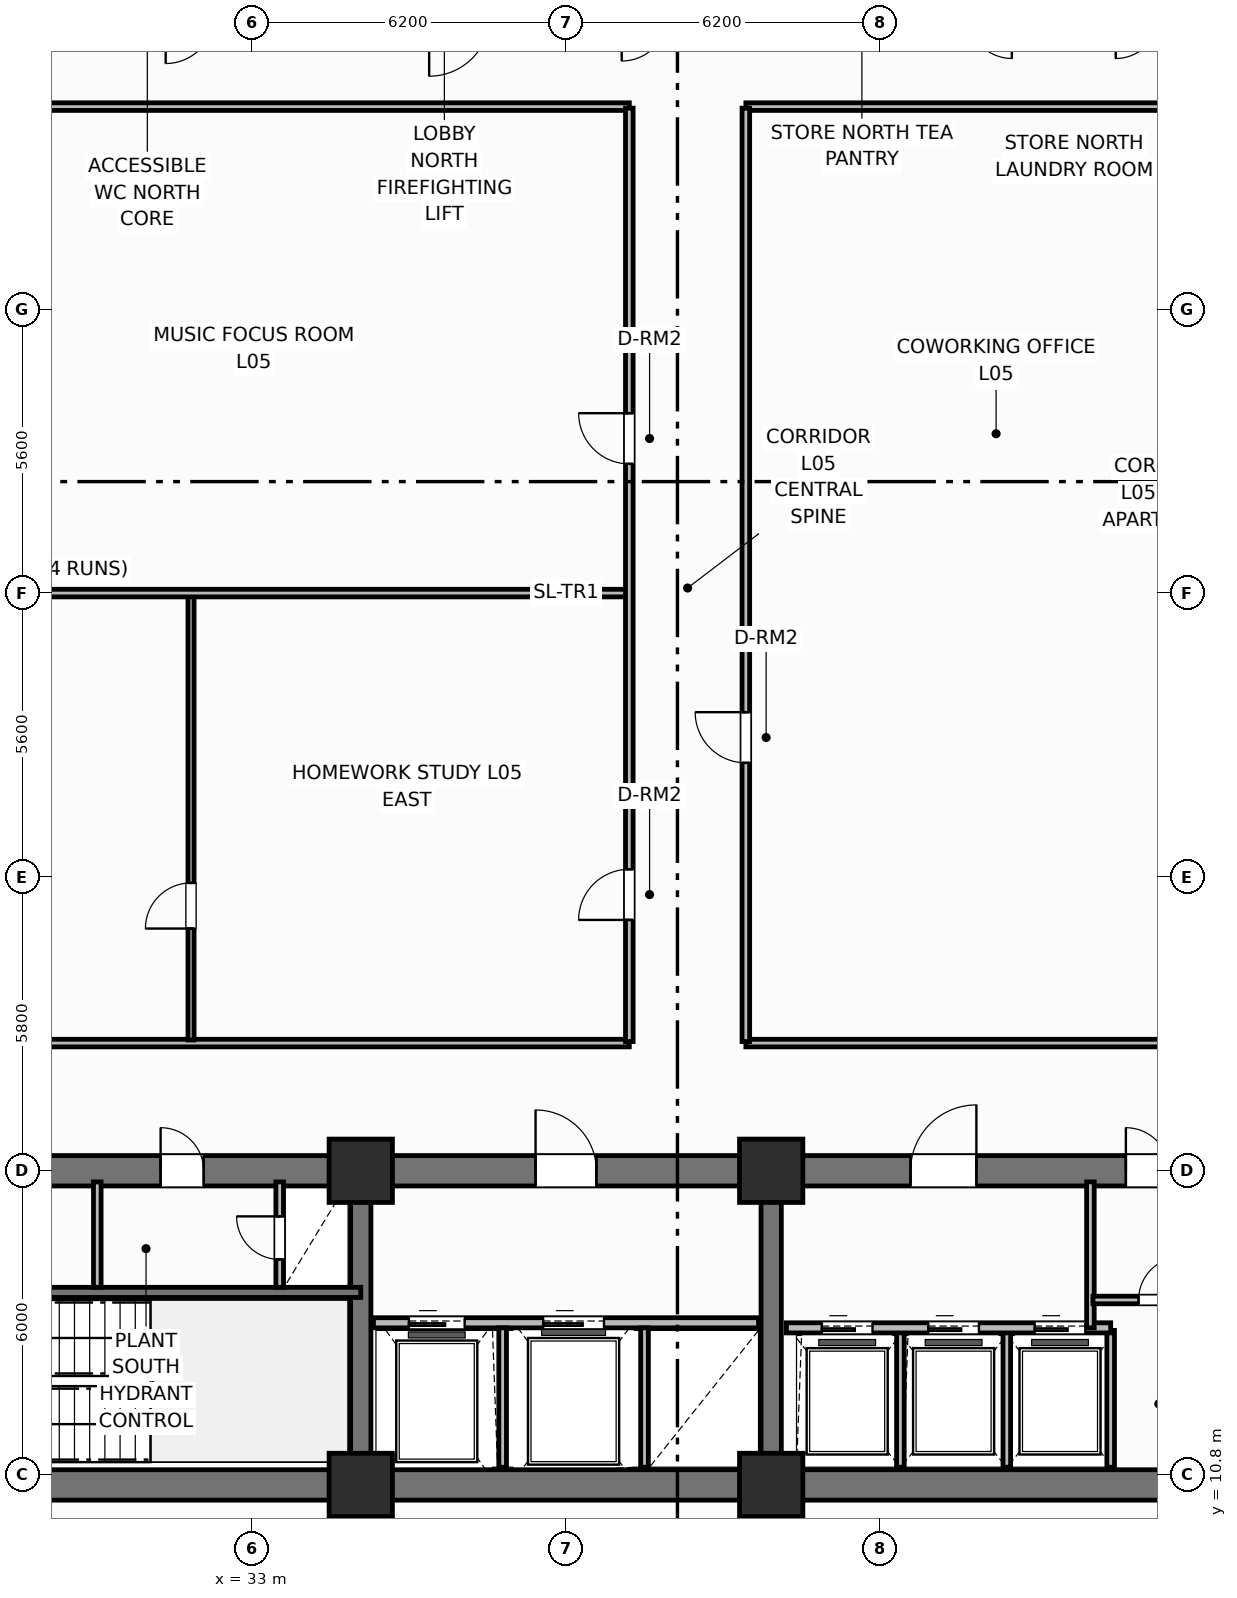
"""IFC4 building model, lengths in metres.
Left out: names, types, materials, properties, quantities, classifications, styles, units other than length and angle.
Written with IfcOpenShell. Run it as: python <this file> out.ifc"""

import sys

from ifc_helpers import new_model, si_unit, direction, frame, frame_2d, origin, origin_2d, place, context, subcontext, project, spatial, rectangle, extrude, element, fill, save


model = new_model("IFC4")
c1 = context("Model", 3, precision=1e-05, world=origin(), true_north=direction((0.0, 1.0)))
c2 = subcontext(c1, "Body", "Model", "MODEL_VIEW")
j1 = project(units=[si_unit("LENGTHUNIT", "METRE"), si_unit("PLANEANGLEUNIT", "RADIAN")], contexts=[c1])
p1 = place(None, origin())
s1 = spatial("IfcSite", under=j1, at=p1, CompositionType="ELEMENT")
p2 = place(p1, origin())
s2 = spatial("IfcBuilding", under=s1, at=p2, CompositionType="ELEMENT")
p3 = place(p2, frame((0.0, 0.0, 24.6)))
s3 = spatial("IfcBuildingStorey", under=s2, at=p3, CompositionType="ELEMENT", Elevation=24.6)
p4 = place(p3, frame((52.8, 10.6, 0.0), z_axis=(0.0, 0.0, 1.0), x_axis=(-1.0, 0.0, 0.0)))
e1 = element("IfcWall", 1, at=p4, inside=s3, PredefinedType="SHEAR", context=c2, shape_type="SweptSolid", body=[
    extrude(rectangle(XDim=27.2, YDim=0.6, at=frame_2d((13.6, 0.0))), origin(), (0.0, 0.0, 1.0), 4.2),
])
p5 = place(p3, frame((25.6, 16.8, 0.0), z_axis=(0.0, 0.0, 1.0), x_axis=(1.0, 0.0, 0.0)))
e2 = element("IfcWall", 2, at=p5, inside=s3, PredefinedType="SHEAR", context=c2, shape_type="SweptSolid", body=[
    extrude(rectangle(XDim=27.2, YDim=0.6, at=frame_2d((13.6, 0.0))), origin(), (0.0, 0.0, 1.0), 4.2),
])
p6 = place(p5, frame((1.8, 0.0, 0.0)))
e3 = element("IfcOpeningElement", 3, at=p6, cuts=e2, PredefinedType="OPENING", context=c2, shape_type="SweptSolid", body=[
    extrude(rectangle(XDim=1.1, YDim=2.15, at=frame_2d((0.55, 1.075))), frame((0.0, 0.31, 0.0), z_axis=(0.0, -1.0, 0.0), x_axis=(1.0, 0.0, 0.0)), (0.0, 0.0, 1.0), 0.62),
])
p7 = place(p5, frame((5.6, 0.0, 0.0)))
e4 = element("IfcOpeningElement", 4, at=p7, cuts=e2, PredefinedType="OPENING", context=c2, shape_type="SweptSolid", body=[
    extrude(rectangle(XDim=0.85, YDim=2.1, at=frame_2d((0.425, 1.05))), frame((0.0, 0.31, 0.0), z_axis=(0.0, -1.0, 0.0), x_axis=(1.0, 0.0, 0.0)), (0.0, 0.0, 1.0), 0.62),
])
p8 = place(p5, frame((13.0, 0.0, 0.0)))
e5 = element("IfcOpeningElement", 5, at=p8, cuts=e2, PredefinedType="OPENING", context=c2, shape_type="SweptSolid", body=[
    extrude(rectangle(XDim=1.2, YDim=2.15, at=frame_2d((0.6, 1.075))), frame((0.0, 0.31, 0.0), z_axis=(0.0, -1.0, 0.0), x_axis=(1.0, 0.0, 0.0)), (0.0, 0.0, 1.0), 0.62),
])
p9 = place(p5, frame((20.4, 0.0, 0.0)))
e6 = element("IfcOpeningElement", 6, at=p9, cuts=e2, PredefinedType="OPENING", context=c2, shape_type="SweptSolid", body=[
    extrude(rectangle(XDim=1.3, YDim=2.2, at=frame_2d((0.65, 1.1))), frame((0.0, 0.31, 0.0), z_axis=(0.0, -1.0, 0.0), x_axis=(1.0, 0.0, 0.0)), (0.0, 0.0, 1.0), 0.62),
])
p10 = place(p5, frame((24.65, 0.0, 0.0)))
e7 = element("IfcOpeningElement", 7, at=p10, cuts=e2, PredefinedType="OPENING", context=c2, shape_type="SweptSolid", body=[
    extrude(rectangle(XDim=0.85, YDim=2.1, at=frame_2d((0.425, 1.05))), frame((0.0, 0.31, 0.0), z_axis=(0.0, -1.0, 0.0), x_axis=(1.0, 0.0, 0.0)), (0.0, 0.0, 1.0), 0.62),
])
for number, where, z_axis, x_axis in (
    (8, (35.15, 10.9, 0.0), (0.0, 0.0, 1.0), (0.0, 1.0, 0.0)),
    (9, (43.25, 10.9, 0.0), (0.0, 0.0, 1.0), (0.0, 1.0, 0.0)),
):
    element("IfcWall", number, at=place(p3, frame(where, z_axis=z_axis, x_axis=x_axis)), inside=s3, PredefinedType="SHEAR", context=c2, shape_type="SweptSolid", body=[
        extrude(rectangle(XDim=5.6, YDim=0.4, at=frame_2d((2.8, 0.0))), origin(), (0.0, 0.0, 1.0), 4.2),
    ])
for number, where, z_axis, x_axis in (
    (10, (35.15, 10.6, 0.0), (0.0, 0.0, 1.0), (1.0, 0.0, 0.0)),
    (11, (35.15, 16.8, 0.0), (0.0, 0.0, 1.0), (1.0, 0.0, 0.0)),
    (12, (43.25, 10.6, 0.0), (0.0, 0.0, 1.0), (1.0, 0.0, 0.0)),
    (13, (43.25, 16.8, 0.0), (0.0, 0.0, 1.0), (1.0, 0.0, 0.0)),
):
    element("IfcColumn", number, at=place(p3, frame(where, z_axis=z_axis, x_axis=x_axis)), inside=s3, PredefinedType="COLUMN", context=c2, shape_type="SweptSolid", body=[
        extrude(rectangle(XDim=1.25, YDim=1.25, at=origin_2d()), origin(), (0.0, 0.0, 1.0), 4.2),
    ])
p11 = place(p3, frame((25.6, 14.4, 0.0), z_axis=(0.0, 0.0, 1.0), x_axis=(1.0, 0.0, 0.0)))
e14 = element("IfcWall", 14, at=p11, inside=s3, PredefinedType="SHEAR", context=c2, shape_type="SweptSolid", body=[
    extrude(rectangle(XDim=9.55, YDim=0.2, at=frame_2d((4.775, 0.0))), origin(), (0.0, 0.0, 1.0), 4.2),
])
p12 = place(p11, frame((1.05, 0.0, 0.0)))
e15 = element("IfcOpeningElement", 15, at=p12, cuts=e14, PredefinedType="OPENING", context=c2, shape_type="SweptSolid", body=[
    extrude(rectangle(XDim=1.1, YDim=2.15, at=frame_2d((0.55, 1.075))), frame((0.0, 0.11, 0.0), z_axis=(0.0, -1.0, 0.0), x_axis=(1.0, 0.0, 0.0)), (0.0, 0.0, 1.0), 0.22),
])
p13 = place(p3, frame((29.95, 14.5, 0.0), z_axis=(0.0, 0.0, 1.0), x_axis=(0.0, 1.0, 0.0)))
e16 = element("IfcWall", 16, at=p13, inside=s3, PredefinedType="PARTITIONING", context=c2, shape_type="SweptSolid", body=[
    extrude(rectangle(XDim=2.08, YDim=0.15, at=frame_2d((1.04, 0.0))), origin(), (0.0, 0.0, 1.0), 3.03),
])
p14 = place(p3, frame((33.55, 14.5, 0.0), z_axis=(0.0, 0.0, 1.0), x_axis=(0.0, 1.0, 0.0)))
e17 = element("IfcWall", 17, at=p14, inside=s3, PredefinedType="PARTITIONING", context=c2, shape_type="SweptSolid", body=[
    extrude(rectangle(XDim=2.08, YDim=0.15, at=frame_2d((1.04, 0.0))), origin(), (0.0, 0.0, 1.0), 3.03),
])
p15 = place(p14, frame((0.55, 0.0, 0.0)))
e18 = element("IfcOpeningElement", 18, at=p15, cuts=e17, PredefinedType="OPENING", context=c2, shape_type="SweptSolid", body=[
    extrude(rectangle(XDim=0.85, YDim=2.05, at=frame_2d((0.425, 1.025))), frame((0.0, 0.085, 0.0), z_axis=(0.0, -1.0, 0.0), x_axis=(1.0, 0.0, 0.0)), (0.0, 0.0, 1.0), 0.17),
])
p16 = place(p3, frame((35.4, 13.8, 0.0), z_axis=(0.0, 0.0, 1.0), x_axis=(1.0, 0.0, 0.0)))
e19 = element("IfcWall", 19, at=p16, inside=s3, PredefinedType="PARTITIONING", context=c2, shape_type="SweptSolid", body=[
    extrude(rectangle(XDim=7.6, YDim=0.2, at=frame_2d((3.8, 0.0))), origin(), (0.0, 0.0, 1.0), 2.8),
])
p17 = place(p16, frame((0.7, 0.0, 0.0)))
e20 = element("IfcOpeningElement", 20, at=p17, cuts=e19, PredefinedType="OPENING", context=c2, shape_type="SweptSolid", body=[
    extrude(rectangle(XDim=1.1, YDim=2.15, at=frame_2d((0.55, 1.075))), frame((0.0, 0.11, 0.0), z_axis=(0.0, -1.0, 0.0), x_axis=(1.0, 0.0, 0.0)), (0.0, 0.0, 1.0), 0.22),
])
p18 = place(p16, frame((3.35, 0.0, 0.0)))
e21 = element("IfcOpeningElement", 21, at=p18, cuts=e19, PredefinedType="OPENING", context=c2, shape_type="SweptSolid", body=[
    extrude(rectangle(XDim=1.2, YDim=2.15, at=frame_2d((0.6, 1.075))), frame((0.0, 0.11, 0.0), z_axis=(0.0, -1.0, 0.0), x_axis=(1.0, 0.0, 0.0)), (0.0, 0.0, 1.0), 0.22),
])
for number, where, z_axis, x_axis in (
    (22, (37.95, 10.95, 0.0), (0.0, 0.0, 1.0), (0.0, 1.0, 0.0)),
    (23, (40.75, 10.95, 0.0), (0.0, 0.0, 1.0), (0.0, 1.0, 0.0)),
):
    element("IfcWall", number, at=place(p3, frame(where, z_axis=z_axis, x_axis=x_axis)), inside=s3, PredefinedType="PARTITIONING", context=c2, shape_type="SweptSolid", body=[
        extrude(rectangle(XDim=2.75, YDim=0.15, at=frame_2d((1.375, 0.0))), origin(), (0.0, 0.0, 1.0), 3.03),
    ])
for number, where, z_axis, x_axis in (
    (24, (45.8, 10.95, 0.0), (0.0, 0.0, 1.0), (0.0, 1.0, 0.0)),
    (25, (47.9, 10.95, 0.0), (0.0, 0.0, 1.0), (0.0, 1.0, 0.0)),
    (26, (49.95, 10.95, 0.0), (0.0, 0.0, 1.0), (0.0, 1.0, 0.0)),
):
    element("IfcWall", number, at=place(p3, frame(where, z_axis=z_axis, x_axis=x_axis)), inside=s3, PredefinedType="PARTITIONING", context=c2, shape_type="SweptSolid", body=[
        extrude(rectangle(XDim=2.7, YDim=0.15, at=frame_2d((1.35, 0.0))), origin(), (0.0, 0.0, 1.0), 3.03),
    ])
p19 = place(p3, frame((43.55, 13.7, 0.0), z_axis=(0.0, 0.0, 1.0), x_axis=(1.0, 0.0, 0.0)))
e27 = element("IfcWall", 27, at=p19, inside=s3, PredefinedType="PARTITIONING", context=c2, shape_type="SweptSolid", body=[
    extrude(rectangle(XDim=6.4, YDim=0.2, at=frame_2d((3.2, 0.0))), origin(), (0.0, 0.0, 1.0), 3.03),
])
p20 = place(p19, frame((0.7, 0.0, 0.0)))
e28 = element("IfcOpeningElement", 28, at=p20, cuts=e27, PredefinedType="OPENING", context=c2, shape_type="SweptSolid", body=[
    extrude(rectangle(XDim=1.0, YDim=2.15, at=frame_2d((0.5, 1.075))), frame((0.0, 0.11, 0.0), z_axis=(0.0, -1.0, 0.0), x_axis=(1.0, 0.0, 0.0)), (0.0, 0.0, 1.0), 0.22),
])
p21 = place(p19, frame((2.8, 0.0, 0.0)))
e29 = element("IfcOpeningElement", 29, at=p21, cuts=e27, PredefinedType="OPENING", context=c2, shape_type="SweptSolid", body=[
    extrude(rectangle(XDim=1.0, YDim=2.15, at=frame_2d((0.5, 1.075))), frame((0.0, 0.11, 0.0), z_axis=(0.0, -1.0, 0.0), x_axis=(1.0, 0.0, 0.0)), (0.0, 0.0, 1.0), 0.22),
])
p22 = place(p19, frame((4.9, 0.0, 0.0)))
e30 = element("IfcOpeningElement", 30, at=p22, cuts=e27, PredefinedType="OPENING", context=c2, shape_type="SweptSolid", body=[
    extrude(rectangle(XDim=1.0, YDim=2.15, at=frame_2d((0.5, 1.075))), frame((0.0, 0.11, 0.0), z_axis=(0.0, -1.0, 0.0), x_axis=(1.0, 0.0, 0.0)), (0.0, 0.0, 1.0), 0.22),
])
p23 = place(p3, frame((49.55, 13.7, 0.0), z_axis=(0.0, 0.0, 1.0), x_axis=(0.0, 1.0, 0.0)))
e31 = element("IfcWall", 31, at=p23, inside=s3, PredefinedType="PARTITIONING", context=c2, shape_type="SweptSolid", body=[
    extrude(rectangle(XDim=2.88, YDim=0.15, at=frame_2d((1.44, 0.0))), origin(), (0.0, 0.0, 1.0), 3.03),
])
p24 = place(p3, frame((49.6, 14.25, 0.0), z_axis=(0.0, 0.0, 1.0), x_axis=(1.0, 0.0, 0.0)))
e32 = element("IfcWall", 32, at=p24, inside=s3, PredefinedType="PARTITIONING", context=c2, shape_type="SweptSolid", body=[
    extrude(rectangle(XDim=2.85, YDim=0.15, at=frame_2d((1.425, 0.0))), origin(), (0.0, 0.0, 1.0), 3.03),
])
p25 = place(p24, frame((0.9, 0.0, 0.0)))
e33 = element("IfcOpeningElement", 33, at=p25, cuts=e32, PredefinedType="OPENING", context=c2, shape_type="SweptSolid", body=[
    extrude(rectangle(XDim=0.85, YDim=2.1, at=frame_2d((0.425, 1.05))), frame((0.0, 0.085, 0.0), z_axis=(0.0, -1.0, 0.0), x_axis=(1.0, 0.0, 0.0)), (0.0, 0.0, 1.0), 0.17),
])
p26 = place(p3, frame((25.55, 19.32, 0.0), z_axis=(0.0, 0.0, 1.0), x_axis=(1.0, 0.0, 0.0)))
e34 = element("IfcWall", 34, at=p26, inside=s3, PredefinedType="PARTITIONING", context=c2, shape_type="SweptSolid", body=[
    extrude(rectangle(XDim=14.9, YDim=0.15, at=frame_2d((7.45, 0.0))), origin(), (0.0, 0.0, 1.0), 3.03),
])
p27 = place(p3, frame((42.75, 19.32, 0.0), z_axis=(0.0, 0.0, 1.0), x_axis=(1.0, 0.0, 0.0)))
e35 = element("IfcWall", 35, at=p27, inside=s3, PredefinedType="PARTITIONING", context=c2, shape_type="SweptSolid", body=[
    extrude(rectangle(XDim=10.1, YDim=0.15, at=frame_2d((5.05, 0.0))), origin(), (0.0, 0.0, 1.0), 3.03),
])
p28 = place(p3, frame((25.55, 37.8, 0.0), z_axis=(0.0, 0.0, 1.0), x_axis=(1.0, 0.0, 0.0)))
e36 = element("IfcWall", 36, at=p28, inside=s3, PredefinedType="PARTITIONING", context=c2, shape_type="SweptSolid", body=[
    extrude(rectangle(XDim=14.9, YDim=0.15, at=frame_2d((7.45, 0.0))), origin(), (0.0, 0.0, 1.0), 3.03),
])
p29 = place(p3, frame((42.75, 37.8, 0.0), z_axis=(0.0, 0.0, 1.0), x_axis=(1.0, 0.0, 0.0)))
e37 = element("IfcWall", 37, at=p29, inside=s3, PredefinedType="PARTITIONING", context=c2, shape_type="SweptSolid", body=[
    extrude(rectangle(XDim=10.1, YDim=0.15, at=frame_2d((5.05, 0.0))), origin(), (0.0, 0.0, 1.0), 3.03),
])
p30 = place(p3, frame((31.8, 19.38, 0.0), z_axis=(0.0, 0.0, 1.0), x_axis=(0.0, 1.0, 0.0)))
e38 = element("IfcWall", 38, at=p30, inside=s3, PredefinedType="PARTITIONING", context=c2, shape_type="SweptSolid", body=[
    extrude(rectangle(XDim=8.77, YDim=0.12, at=frame_2d((4.385, 0.0))), origin(), (0.0, 0.0, 1.0), 3.03),
])
p31 = place(p30, frame((2.2, 0.0, 0.0)))
e39 = element("IfcOpeningElement", 39, at=p31, cuts=e38, PredefinedType="OPENING", context=c2, shape_type="SweptSolid", body=[
    extrude(rectangle(XDim=0.9, YDim=2.1, at=frame_2d((0.45, 1.05))), frame((0.0, 0.07, 0.0), z_axis=(0.0, -1.0, 0.0), x_axis=(1.0, 0.0, 0.0)), (0.0, 0.0, 1.0), 0.14),
])
p32 = place(p3, frame((25.6, 28.2, 0.0), z_axis=(0.0, 0.0, 1.0), x_axis=(1.0, 0.0, 0.0)))
e40 = element("IfcWall", 40, at=p32, inside=s3, PredefinedType="PARTITIONING", context=c2, shape_type="SweptSolid", body=[
    extrude(rectangle(XDim=14.87, YDim=0.15, at=frame_2d((7.435, 0.0))), origin(), (0.0, 0.0, 1.0), 3.03),
])
p33 = place(p3, frame((40.45, 19.35, 0.0), z_axis=(0.0, 0.0, 1.0), x_axis=(0.0, 1.0, 0.0)))
e41 = element("IfcWall", 41, at=p33, inside=s3, PredefinedType="PARTITIONING", context=c2, shape_type="SweptSolid", body=[
    extrude(rectangle(XDim=18.42, YDim=0.15, at=frame_2d((9.21, 0.0))), origin(), (0.0, 0.0, 1.0), 3.03),
])
p34 = place(p33, frame((2.4, 0.0, 0.0)))
e42 = element("IfcOpeningElement", 42, at=p34, cuts=e41, PredefinedType="OPENING", context=c2, shape_type="SweptSolid", body=[
    extrude(rectangle(XDim=1.0, YDim=2.15, at=frame_2d((0.5, 1.075))), frame((0.0, 0.085, 0.0), z_axis=(0.0, -1.0, 0.0), x_axis=(1.0, 0.0, 0.0)), (0.0, 0.0, 1.0), 0.17),
])
p35 = place(p33, frame((11.4, 0.0, 0.0)))
e43 = element("IfcOpeningElement", 43, at=p35, cuts=e41, PredefinedType="OPENING", context=c2, shape_type="SweptSolid", body=[
    extrude(rectangle(XDim=1.0, YDim=2.15, at=frame_2d((0.5, 1.075))), frame((0.0, 0.085, 0.0), z_axis=(0.0, -1.0, 0.0), x_axis=(1.0, 0.0, 0.0)), (0.0, 0.0, 1.0), 0.17),
])
p36 = place(p3, frame((42.75, 19.35, 0.0), z_axis=(0.0, 0.0, 1.0), x_axis=(0.0, 1.0, 0.0)))
e44 = element("IfcWall", 44, at=p36, inside=s3, PredefinedType="PARTITIONING", context=c2, shape_type="SweptSolid", body=[
    extrude(rectangle(XDim=18.42, YDim=0.15, at=frame_2d((9.21, 0.0))), origin(), (0.0, 0.0, 1.0), 3.03),
])
p37 = place(p36, frame((5.5, 0.0, 0.0)))
e45 = element("IfcOpeningElement", 45, at=p37, cuts=e44, PredefinedType="OPENING", context=c2, shape_type="SweptSolid", body=[
    extrude(rectangle(XDim=1.0, YDim=2.15, at=frame_2d((0.5, 1.075))), frame((0.0, 0.085, 0.0), z_axis=(0.0, -1.0, 0.0), x_axis=(1.0, 0.0, 0.0)), (0.0, 0.0, 1.0), 0.17),
])
p38 = place(p15, origin())
e46 = element("IfcDoor", 46, at=p38, inside=s3, OperationType="SINGLE_SWING_RIGHT", PredefinedType="TRAPDOOR", context=c2, shape_type="SweptSolid", body=[
    extrude(rectangle(XDim=0.85, YDim=2.05, at=frame_2d((0.425, 1.025))), frame((0.0, 0.025, 0.0), z_axis=(0.0, -1.0, 0.0), x_axis=(1.0, 0.0, 0.0)), (0.0, 0.0, 1.0), 0.05),
])
fill(e18, e46)
p39 = place(p17, origin())
e47 = element("IfcDoor", 47, at=p39, inside=s3, OperationType="SLIDING_TO_LEFT", PredefinedType="DOOR", context=c2, shape_type="SweptSolid", body=[
    extrude(rectangle(XDim=1.1, YDim=2.15, at=frame_2d((0.55, 1.075))), frame((0.0, 0.025, 0.0), z_axis=(0.0, -1.0, 0.0), x_axis=(1.0, 0.0, 0.0)), (0.0, 0.0, 1.0), 0.05),
])
fill(e20, e47)
p40 = place(p18, origin())
e48 = element("IfcDoor", 48, at=p40, inside=s3, OperationType="SLIDING_TO_LEFT", PredefinedType="DOOR", context=c2, shape_type="SweptSolid", body=[
    extrude(rectangle(XDim=1.2, YDim=2.15, at=frame_2d((0.6, 1.075))), frame((0.0, 0.025, 0.0), z_axis=(0.0, -1.0, 0.0), x_axis=(1.0, 0.0, 0.0)), (0.0, 0.0, 1.0), 0.05),
])
fill(e21, e48)
p41 = place(p20, origin())
e49 = element("IfcDoor", 49, at=p41, inside=s3, OperationType="SLIDING_TO_LEFT", PredefinedType="DOOR", context=c2, shape_type="SweptSolid", body=[
    extrude(rectangle(XDim=1.0, YDim=2.15, at=frame_2d((0.5, 1.075))), frame((0.0, 0.025, 0.0), z_axis=(0.0, -1.0, 0.0), x_axis=(1.0, 0.0, 0.0)), (0.0, 0.0, 1.0), 0.05),
])
fill(e28, e49)
p42 = place(p21, origin())
e50 = element("IfcDoor", 50, at=p42, inside=s3, OperationType="SLIDING_TO_LEFT", PredefinedType="DOOR", context=c2, shape_type="SweptSolid", body=[
    extrude(rectangle(XDim=1.0, YDim=2.15, at=frame_2d((0.5, 1.075))), frame((0.0, 0.025, 0.0), z_axis=(0.0, -1.0, 0.0), x_axis=(1.0, 0.0, 0.0)), (0.0, 0.0, 1.0), 0.05),
])
fill(e29, e50)
p43 = place(p22, origin())
e51 = element("IfcDoor", 51, at=p43, inside=s3, OperationType="SLIDING_TO_LEFT", PredefinedType="DOOR", context=c2, shape_type="SweptSolid", body=[
    extrude(rectangle(XDim=1.0, YDim=2.15, at=frame_2d((0.5, 1.075))), frame((0.0, 0.025, 0.0), z_axis=(0.0, -1.0, 0.0), x_axis=(1.0, 0.0, 0.0)), (0.0, 0.0, 1.0), 0.05),
])
fill(e30, e51)
p44 = place(p25, origin())
e52 = element("IfcDoor", 52, at=p44, inside=s3, OperationType="SINGLE_SWING_RIGHT", PredefinedType="DOOR", context=c2, shape_type="SweptSolid", body=[
    extrude(rectangle(XDim=0.85, YDim=2.1, at=frame_2d((0.425, 1.05))), frame((0.0, 0.025, 0.0), z_axis=(0.0, -1.0, 0.0), x_axis=(1.0, 0.0, 0.0)), (0.0, 0.0, 1.0), 0.05),
])
fill(e33, e52)
p45 = place(p31, origin())
e53 = element("IfcDoor", 53, at=p45, inside=s3, OperationType="SINGLE_SWING_LEFT", PredefinedType="DOOR", context=c2, shape_type="SweptSolid", body=[
    extrude(rectangle(XDim=0.9, YDim=2.1, at=frame_2d((0.45, 1.05))), frame((0.0, 0.025, 0.0), z_axis=(0.0, -1.0, 0.0), x_axis=(1.0, 0.0, 0.0)), (0.0, 0.0, 1.0), 0.05),
])
fill(e39, e53)
p46 = place(p34, origin())
e54 = element("IfcDoor", 54, at=p46, inside=s3, OperationType="SINGLE_SWING_LEFT", PredefinedType="DOOR", context=c2, shape_type="SweptSolid", body=[
    extrude(rectangle(XDim=1.0, YDim=2.15, at=frame_2d((0.5, 1.075))), frame((0.0, 0.025, 0.0), z_axis=(0.0, -1.0, 0.0), x_axis=(1.0, 0.0, 0.0)), (0.0, 0.0, 1.0), 0.05),
])
fill(e42, e54)
p47 = place(p35, origin())
e55 = element("IfcDoor", 55, at=p47, inside=s3, OperationType="SINGLE_SWING_RIGHT", PredefinedType="DOOR", context=c2, shape_type="SweptSolid", body=[
    extrude(rectangle(XDim=1.0, YDim=2.15, at=frame_2d((0.5, 1.075))), frame((0.0, 0.025, 0.0), z_axis=(0.0, -1.0, 0.0), x_axis=(1.0, 0.0, 0.0)), (0.0, 0.0, 1.0), 0.05),
])
fill(e43, e55)
p48 = place(p37, origin())
e56 = element("IfcDoor", 56, at=p48, inside=s3, OperationType="SINGLE_SWING_RIGHT", PredefinedType="DOOR", context=c2, shape_type="SweptSolid", body=[
    extrude(rectangle(XDim=1.0, YDim=2.15, at=frame_2d((0.5, 1.075))), frame((0.0, 0.025, 0.0), z_axis=(0.0, -1.0, 0.0), x_axis=(1.0, 0.0, 0.0)), (0.0, 0.0, 1.0), 0.05),
])
fill(e45, e56)
p49 = place(p7, origin())
e57 = element("IfcDoor", 57, at=p49, inside=s3, OperationType="SINGLE_SWING_LEFT", PredefinedType="DOOR", context=c2, shape_type="SweptSolid", body=[
    extrude(rectangle(XDim=0.85, YDim=2.1, at=frame_2d((0.425, 1.05))), frame((0.0, 0.025, 0.0), z_axis=(0.0, -1.0, 0.0), x_axis=(1.0, 0.0, 0.0)), (0.0, 0.0, 1.0), 0.05),
])
fill(e4, e57)
p50 = place(p8, origin())
e58 = element("IfcDoor", 58, at=p50, inside=s3, OperationType="SINGLE_SWING_LEFT", PredefinedType="DOOR", context=c2, shape_type="SweptSolid", body=[
    extrude(rectangle(XDim=1.2, YDim=2.15, at=frame_2d((0.6, 1.075))), frame((0.0, 0.025, 0.0), z_axis=(0.0, -1.0, 0.0), x_axis=(1.0, 0.0, 0.0)), (0.0, 0.0, 1.0), 0.05),
])
fill(e5, e58)
p51 = place(p9, origin())
e59 = element("IfcDoor", 59, at=p51, inside=s3, OperationType="SINGLE_SWING_RIGHT", PredefinedType="DOOR", context=c2, shape_type="SweptSolid", body=[
    extrude(rectangle(XDim=1.3, YDim=2.2, at=frame_2d((0.65, 1.1))), frame((0.0, 0.025, 0.0), z_axis=(0.0, -1.0, 0.0), x_axis=(1.0, 0.0, 0.0)), (0.0, 0.0, 1.0), 0.05),
])
fill(e6, e59)
p52 = place(p10, origin())
e60 = element("IfcDoor", 60, at=p52, inside=s3, OperationType="SINGLE_SWING_LEFT", PredefinedType="DOOR", context=c2, shape_type="SweptSolid", body=[
    extrude(rectangle(XDim=0.85, YDim=2.1, at=frame_2d((0.425, 1.05))), frame((0.0, 0.025, 0.0), z_axis=(0.0, -1.0, 0.0), x_axis=(1.0, 0.0, 0.0)), (0.0, 0.0, 1.0), 0.05),
])
fill(e7, e60)
save(model, sys.argv[1])
